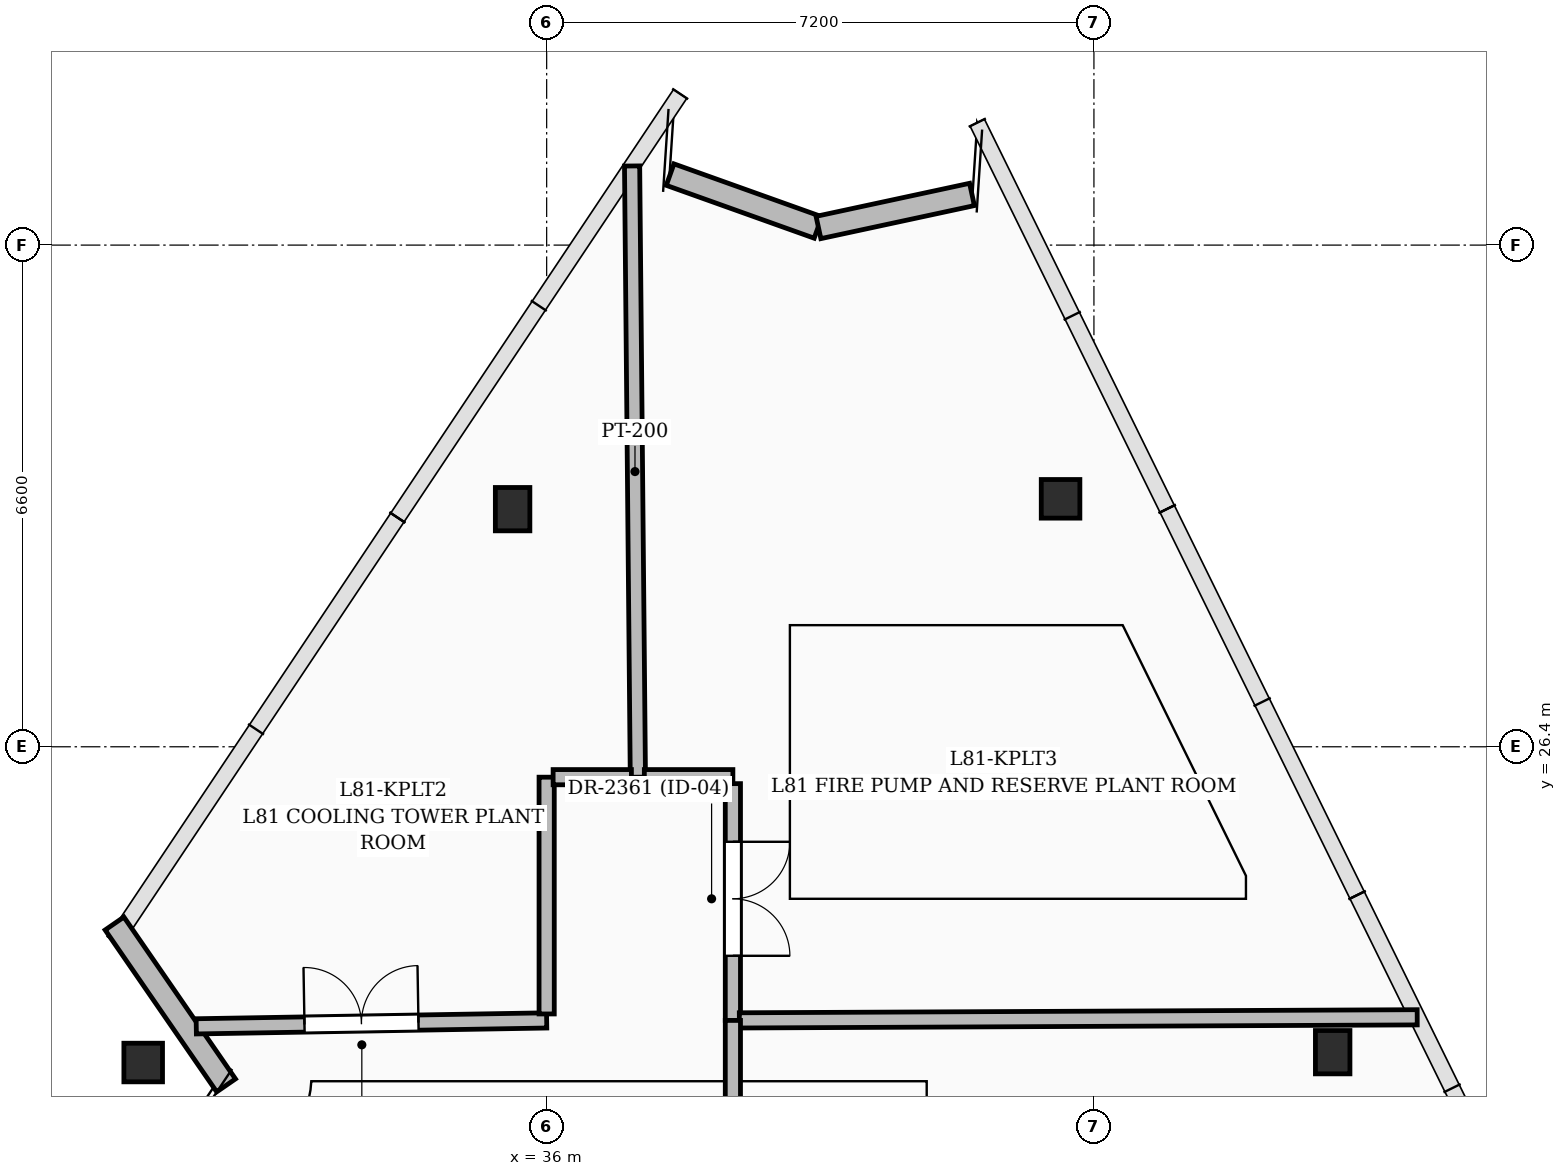
"""IFC4 building model, lengths in metres.
Left out: names, types, materials, properties, quantities, classifications, styles, units other than length and angle.
Written with IfcOpenShell. Run it as: python <this file> out.ifc"""

import sys

from ifc_helpers import new_model, si_unit, direction, frame, frame_2d, origin, origin_2d, place, context, subcontext, project, spatial, rectangle, hollow_circle, i_section, extrude, element, fill, save


model = new_model("IFC4")
c1 = context("Model", 3, precision=1e-05, world=origin(), true_north=direction((0.0, 1.0)))
c2 = subcontext(c1, "Body", "Model", "MODEL_VIEW")
j1 = project(units=[si_unit("LENGTHUNIT", "METRE"), si_unit("PLANEANGLEUNIT", "RADIAN")], contexts=[c1])
p1 = place(None, origin())
s1 = spatial("IfcSite", under=j1, at=p1, CompositionType="ELEMENT")
p2 = place(p1, origin())
s2 = spatial("IfcBuilding", under=s1, at=p2, CompositionType="ELEMENT")
p3 = place(p2, frame((0.0, 0.0, 314.5)))
s3 = spatial("IfcBuildingStorey", under=s2, at=p3, CompositionType="ELEMENT", Elevation=314.5)
p4 = place(p3, frame((46.341, 22.382, 0.0), z_axis=(0.0, 0.0, 1.0), x_axis=(1.0, 0.0, 0.0)))
e1 = element("IfcColumn", 1, at=p4, inside=s3, PredefinedType="COLUMN", context=c2, shape_type="SweptSolid", body=[
    extrude(i_section(OverallWidth=0.454, OverallDepth=0.57, WebThickness=0.078, FlangeThickness=0.094, FilletRadius=0.02, at=origin_2d()), origin(), (0.0, 0.0, 1.0), 4.0),
])
p5 = place(p3, frame((42.761, 29.662, 0.0), z_axis=(0.0, 0.0, 1.0), x_axis=(1.0, 0.0, 0.0)))
e2 = element("IfcColumn", 2, at=p5, inside=s3, PredefinedType="COLUMN", context=c2, shape_type="SweptSolid", body=[
    extrude(hollow_circle(Radius=0.254, WallThickness=0.016, at=origin_2d()), origin(), (0.0, 0.0, 1.0), 4.0),
])
p6 = place(p3, frame((35.552, 29.526, 0.0), z_axis=(0.0, 0.0, 1.0), x_axis=(1.0, 0.0, 0.0)))
e3 = element("IfcColumn", 3, at=p6, inside=s3, PredefinedType="COLUMN", context=c2, shape_type="SweptSolid", body=[
    extrude(i_section(OverallWidth=0.454, OverallDepth=0.57, WebThickness=0.078, FlangeThickness=0.094, FilletRadius=0.02, at=origin_2d()), origin(), (0.0, 0.0, 1.0), 4.0),
])
p7 = place(p3, frame((30.692, 22.246, 0.0), z_axis=(0.0, 0.0, 1.0), x_axis=(1.0, 0.0, 0.0)))
e4 = element("IfcColumn", 4, at=p7, inside=s3, PredefinedType="COLUMN", context=c2, shape_type="SweptSolid", body=[
    extrude(hollow_circle(Radius=0.254, WallThickness=0.016, at=origin_2d()), origin(), (0.0, 0.0, 1.0), 1.718),
])
p8 = place(p3, frame((31.783, 21.945, 0.0), z_axis=(0.0, 0.0, 1.0), x_axis=(-0.567505768613, 0.823369420486, 0.0)))
e5 = element("IfcWall", 5, at=p8, inside=s3, PredefinedType="SOLIDWALL", context=c2, shape_type="SweptSolid", body=[
    extrude(rectangle(XDim=2.587, YDim=0.3, at=frame_2d((1.293, 0.0))), origin(), (0.0, 0.0, 1.0), 2.3),
])
p9 = place(p3, frame((37.624, 33.927, 0.0), z_axis=(0.0, 0.0, 1.0), x_axis=(0.941672407687, -0.336530944493, 0.0)))
e6 = element("IfcWall", 6, at=p9, inside=s3, PredefinedType="SOLIDWALL", context=c2, shape_type="SweptSolid", body=[
    extrude(rectangle(XDim=2.067, YDim=0.3, at=frame_2d((1.033, 0.0))), origin(), (0.0, 0.0, 1.0), 3.7),
])
p10 = place(p3, frame((39.576, 33.232, 0.0), z_axis=(0.0, 0.0, 1.0), x_axis=(0.977608338725, 0.210432735227, 0.0)))
e7 = element("IfcWall", 7, at=p10, inside=s3, PredefinedType="SOLIDWALL", context=c2, shape_type="SweptSolid", body=[
    extrude(rectangle(XDim=2.066, YDim=0.3, at=frame_2d((1.033, 0.0))), origin(), (0.0, 0.0, 1.0), 3.7),
])
p11 = place(p3, frame((37.2, 26.0, 0.0), z_axis=(0.0, 0.0, 1.0), x_axis=(-0.009442134329, 0.999955422056, 0.0)))
e8 = element("IfcWall", 8, at=p11, inside=s3, PredefinedType="PARTITIONING", context=c2, shape_type="SweptSolid", body=[
    extrude(rectangle(XDim=8.041, YDim=0.2, at=frame_2d((4.021, 0.0))), origin(), (0.0, 0.0, 1.0), 2.977),
])
p12 = place(p3, frame((31.39, 22.722, 0.0), z_axis=(0.0, 0.0, 1.0), x_axis=(0.999856439671, 0.016944026939, 0.0)))
e9 = element("IfcWall", 9, at=p12, inside=s3, PredefinedType="PARTITIONING", context=c2, shape_type="SweptSolid", body=[
    extrude(rectangle(XDim=4.611, YDim=0.2, at=frame_2d((2.305, 0.0))), origin(), (0.0, 0.0, 1.0), 3.035),
])
p13 = place(p12, frame((1.424, 0.0, 0.0)))
e10 = element("IfcOpeningElement", 10, at=p13, cuts=e9, PredefinedType="OPENING", context=c2, shape_type="SweptSolid", body=[
    extrude(rectangle(XDim=1.5, YDim=2.2, at=frame_2d((0.75, 1.1))), frame((0.0, 0.11, 0.0), z_axis=(0.0, -1.0, 0.0), x_axis=(1.0, 0.0, 0.0)), (0.0, 0.0, 1.0), 0.22),
])
p14 = place(p3, frame((36.0, 22.885, 0.0), z_axis=(0.0, 0.0, 1.0), x_axis=(0.0, 1.0, 0.0)))
e11 = element("IfcWall", 11, at=p14, inside=s3, PredefinedType="PARTITIONING", context=c2, shape_type="SweptSolid", body=[
    extrude(rectangle(XDim=3.115, YDim=0.2, at=frame_2d((1.558, 0.0))), origin(), (0.0, 0.0, 1.0), 3.7),
])
p15 = place(p3, frame((36.085, 26.0, 0.0), z_axis=(0.0, 0.0, 1.0), x_axis=(1.0, 0.0, 0.0)))
e12 = element("IfcWall", 12, at=p15, inside=s3, PredefinedType="PARTITIONING", context=c2, shape_type="SweptSolid", body=[
    extrude(rectangle(XDim=1.03, YDim=0.2, at=frame_2d((0.515, 0.0))), origin(), (0.0, 0.0, 1.0), 3.7),
])
p16 = place(p3, frame((37.285, 26.0, 0.0), z_axis=(0.0, 0.0, 1.0), x_axis=(1.0, 0.0, 0.0)))
e13 = element("IfcWall", 13, at=p16, inside=s3, PredefinedType="PARTITIONING", context=c2, shape_type="SweptSolid", body=[
    extrude(rectangle(XDim=1.165, YDim=0.2, at=frame_2d((0.583, 0.0))), origin(), (0.0, 0.0, 1.0), 3.7),
])
p17 = place(p3, frame((38.45, 25.915, 0.0), z_axis=(0.0, 0.0, 1.0), x_axis=(0.0, -1.0, 0.0)))
e14 = element("IfcWall", 14, at=p17, inside=s3, PredefinedType="PARTITIONING", context=c2, shape_type="SweptSolid", body=[
    extrude(rectangle(XDim=3.115, YDim=0.2, at=frame_2d((1.558, 0.0))), origin(), (0.0, 0.0, 1.0), 3.7),
])
p18 = place(p17, frame((0.765, 0.0, 0.0)))
e15 = element("IfcOpeningElement", 15, at=p18, cuts=e14, PredefinedType="OPENING", context=c2, shape_type="SweptSolid", body=[
    extrude(rectangle(XDim=1.5, YDim=2.2, at=frame_2d((0.75, 1.1))), frame((0.0, 0.11, 0.0), z_axis=(0.0, -1.0, 0.0), x_axis=(1.0, 0.0, 0.0)), (0.0, 0.0, 1.0), 0.22),
])
p19 = place(p3, frame((38.535, 22.8, 0.0), z_axis=(0.0, 0.0, 1.0), x_axis=(0.999989549325, 0.004571787526, 0.0)))
e16 = element("IfcWall", 16, at=p19, inside=s3, PredefinedType="PARTITIONING", context=c2, shape_type="SweptSolid", body=[
    extrude(rectangle(XDim=8.918, YDim=0.2, at=frame_2d((4.459, 0.0))), origin(), (0.0, 0.0, 1.0), 2.977),
])
p20 = place(p3, frame((38.45, 17.735, 0.0), z_axis=(0.0, 0.0, 1.0), x_axis=(0.0, 1.0, 0.0)))
e17 = element("IfcWall", 17, at=p20, inside=s3, PredefinedType="PARTITIONING", context=c2, shape_type="SweptSolid", body=[
    extrude(rectangle(XDim=5.065, YDim=0.2, at=frame_2d((2.532, 0.0))), origin(), (0.0, 0.0, 1.0), 3.035),
])
p21 = place(p13, origin())
e18 = element("IfcDoor", 18, at=p21, inside=s3, OperationType="DOUBLE_DOOR_SINGLE_SWING", PredefinedType="DOOR", context=c2, shape_type="SweptSolid", body=[
    extrude(rectangle(XDim=1.5, YDim=2.2, at=frame_2d((0.75, 1.1))), frame((0.0, 0.025, 0.0), z_axis=(0.0, -1.0, 0.0), x_axis=(1.0, 0.0, 0.0)), (0.0, 0.0, 1.0), 0.05),
])
fill(e10, e18)
p22 = place(p18, origin())
e19 = element("IfcDoor", 19, at=p22, inside=s3, OperationType="DOUBLE_DOOR_SINGLE_SWING", PredefinedType="DOOR", context=c2, shape_type="SweptSolid", body=[
    extrude(rectangle(XDim=1.5, YDim=2.2, at=frame_2d((0.75, 1.1))), frame((0.0, 0.025, 0.0), z_axis=(0.0, -1.0, 0.0), x_axis=(1.0, 0.0, 0.0)), (0.0, 0.0, 1.0), 0.05),
])
fill(e15, e19)
save(model, sys.argv[1])
